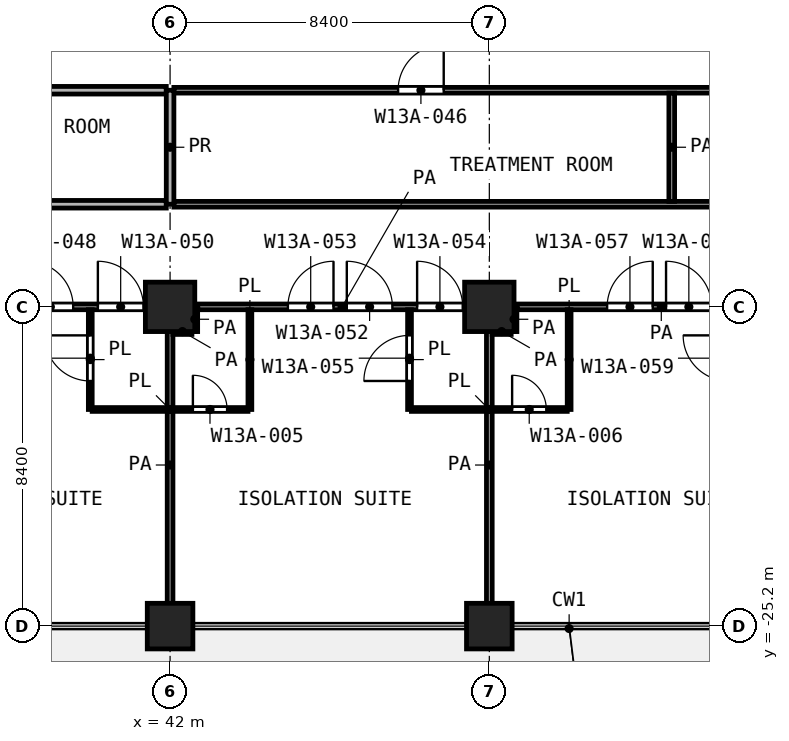
"""IFC4 building model, lengths in metres.
Left out: names, types, materials, properties, quantities, classifications, styles, units other than length and angle.
Written with IfcOpenShell. Run it as: python <this file> out.ifc"""

import sys

from ifc_helpers import new_model, si_unit, direction, frame, frame_2d, origin, origin_2d, place, context, subcontext, project, spatial, rectangle, extrude, element, fill, save


model = new_model("IFC4")
c1 = context("Model", 3, precision=1e-05, world=origin(), true_north=direction((0.0, 1.0)))
c2 = subcontext(c1, "Body", "Model", "MODEL_VIEW")
j1 = project(units=[si_unit("LENGTHUNIT", "METRE"), si_unit("PLANEANGLEUNIT", "RADIAN")], contexts=[c1])
p1 = place(None, origin())
s1 = spatial("IfcSite", under=j1, at=p1, CompositionType="ELEMENT")
p2 = place(p1, origin())
s2 = spatial("IfcBuilding", under=s1, at=p2, CompositionType="ELEMENT")
p3 = place(p2, frame((0.0, 0.0, 60.2)))
s3 = spatial("IfcBuildingStorey", under=s2, at=p3, CompositionType="ELEMENT", Elevation=60.2)
for number, where, z_axis, x_axis in (
    (1, (42.0, -16.8, 0.0), (0.0, 0.0, 1.0), (1.0, 0.0, 0.0)),
    (2, (50.4, -16.8, 0.0), (0.0, 0.0, 1.0), (1.0, 0.0, 0.0)),
):
    element("IfcColumn", number, at=place(p3, frame(where, z_axis=z_axis, x_axis=x_axis)), inside=s3, PredefinedType="COLUMN", context=c2, shape_type="SweptSolid", body=[
        extrude(rectangle(XDim=1.3, YDim=1.3, at=origin_2d()), origin(), (0.0, 0.0, 1.0), 4.2),
    ])
for number, where, z_axis, x_axis in (
    (3, (42.0, -25.2, 0.0), (0.0, 0.0, 1.0), (1.0, 0.0, 0.0)),
    (4, (50.4, -25.2, 0.0), (0.0, 0.0, 1.0), (1.0, 0.0, 0.0)),
):
    element("IfcColumn", number, at=place(p3, frame(where, z_axis=z_axis, x_axis=x_axis)), inside=s3, PredefinedType="COLUMN", context=c2, shape_type="SweptSolid", body=[
        extrude(rectangle(XDim=1.2, YDim=1.2, at=origin_2d()), origin(), (0.0, 0.0, 1.0), 4.2),
    ])
p4 = place(p3, frame((39.95, -19.5, 0.0), z_axis=(0.0, 0.0, 1.0), x_axis=(1.0, 0.0, 0.0)))
e5 = element("IfcWall", 5, at=p4, inside=s3, PredefinedType="PARTITIONING", context=c2, shape_type="SweptSolid", body=[
    extrude(rectangle(XDim=4.1, YDim=0.1, at=frame_2d((2.05, 0.0))), origin(), (0.0, 0.0, 1.0), 3.9),
])
p5 = place(p4, frame((2.65, 0.0, 0.0)))
e6 = element("IfcOpeningElement", 6, at=p5, cuts=e5, PredefinedType="OPENING", context=c2, shape_type="SweptSolid", body=[
    extrude(rectangle(XDim=0.9, YDim=2.1, at=frame_2d((0.45, 1.05))), frame((0.0, 0.06, 0.0), z_axis=(0.0, -1.0, 0.0), x_axis=(1.0, 0.0, 0.0)), (0.0, 0.0, 1.0), 0.12),
])
p6 = place(p3, frame((48.35, -19.5, 0.0), z_axis=(0.0, 0.0, 1.0), x_axis=(1.0, 0.0, 0.0)))
e7 = element("IfcWall", 7, at=p6, inside=s3, PredefinedType="PARTITIONING", context=c2, shape_type="SweptSolid", body=[
    extrude(rectangle(XDim=4.1, YDim=0.1, at=frame_2d((2.05, 0.0))), origin(), (0.0, 0.0, 1.0), 3.9),
])
p7 = place(p6, frame((2.65, 0.0, 0.0)))
e8 = element("IfcOpeningElement", 8, at=p7, cuts=e7, PredefinedType="OPENING", context=c2, shape_type="SweptSolid", body=[
    extrude(rectangle(XDim=0.9, YDim=2.1, at=frame_2d((0.45, 1.05))), frame((0.0, 0.06, 0.0), z_axis=(0.0, -1.0, 0.0), x_axis=(1.0, 0.0, 0.0)), (0.0, 0.0, 1.0), 0.12),
])
p8 = place(p3, frame((39.9, -19.5, 0.0), z_axis=(0.0, 0.0, 1.0), x_axis=(0.0, 1.0, 0.0)))
e9 = element("IfcWall", 9, at=p8, inside=s3, PredefinedType="PARTITIONING", context=c2, shape_type="SweptSolid", body=[
    extrude(rectangle(XDim=2.625, YDim=0.1, at=frame_2d((1.312, 0.0))), origin(), (0.0, 0.0, 1.0), 3.9),
])
p9 = place(p8, frame((0.75, 0.0, 0.0)))
e10 = element("IfcOpeningElement", 10, at=p9, cuts=e9, PredefinedType="OPENING", context=c2, shape_type="SweptSolid", body=[
    extrude(rectangle(XDim=1.2, YDim=2.1, at=frame_2d((0.6, 1.05))), frame((0.0, 0.06, 0.0), z_axis=(0.0, -1.0, 0.0), x_axis=(1.0, 0.0, 0.0)), (0.0, 0.0, 1.0), 0.12),
])
p10 = place(p3, frame((44.1, -19.5, 0.0), z_axis=(0.0, 0.0, 1.0), x_axis=(0.0, 1.0, 0.0)))
e11 = element("IfcWall", 11, at=p10, inside=s3, PredefinedType="PARTITIONING", context=c2, shape_type="SweptSolid", body=[
    extrude(rectangle(XDim=2.625, YDim=0.1, at=frame_2d((1.312, 0.0))), origin(), (0.0, 0.0, 1.0), 3.9),
])
p11 = place(p3, frame((48.3, -19.5, 0.0), z_axis=(0.0, 0.0, 1.0), x_axis=(0.0, 1.0, 0.0)))
e12 = element("IfcWall", 12, at=p11, inside=s3, PredefinedType="PARTITIONING", context=c2, shape_type="SweptSolid", body=[
    extrude(rectangle(XDim=2.625, YDim=0.1, at=frame_2d((1.312, 0.0))), origin(), (0.0, 0.0, 1.0), 3.9),
])
p12 = place(p11, frame((0.75, 0.0, 0.0)))
e13 = element("IfcOpeningElement", 13, at=p12, cuts=e12, PredefinedType="OPENING", context=c2, shape_type="SweptSolid", body=[
    extrude(rectangle(XDim=1.2, YDim=2.1, at=frame_2d((0.6, 1.05))), frame((0.0, 0.06, 0.0), z_axis=(0.0, -1.0, 0.0), x_axis=(1.0, 0.0, 0.0)), (0.0, 0.0, 1.0), 0.12),
])
p13 = place(p3, frame((52.5, -19.5, 0.0), z_axis=(0.0, 0.0, 1.0), x_axis=(0.0, 1.0, 0.0)))
e14 = element("IfcWall", 14, at=p13, inside=s3, PredefinedType="PARTITIONING", context=c2, shape_type="SweptSolid", body=[
    extrude(rectangle(XDim=2.625, YDim=0.1, at=frame_2d((1.312, 0.0))), origin(), (0.0, 0.0, 1.0), 3.9),
])
for number, where, z_axis, x_axis in (
    (15, (42.075, -17.45, 0.0), (0.0, 0.0, 1.0), (1.0, 0.0, 0.0)),
    (16, (50.475, -17.45, 0.0), (0.0, 0.0, 1.0), (1.0, 0.0, 0.0)),
):
    element("IfcWall", number, at=place(p3, frame(where, z_axis=z_axis, x_axis=x_axis)), inside=s3, PredefinedType="PARTITIONING", context=c2, shape_type="SweptSolid", body=[
        extrude(rectangle(XDim=0.5, YDim=0.15, at=frame_2d((0.25, 0.0))), origin(), (0.0, 0.0, 1.0), 3.9),
    ])
p14 = place(p3, frame((25.1, -16.8, 0.0), z_axis=(0.0, 0.0, 1.0), x_axis=(1.0, 0.0, 0.0)))
e17 = element("IfcWall", 17, at=p14, inside=s3, PredefinedType="PARTITIONING", context=c2, shape_type="SweptSolid", body=[
    extrude(rectangle(XDim=16.823, YDim=0.15, at=frame_2d((8.412, 0.0))), origin(), (0.0, 0.0, 1.0), 3.9),
])
p15 = place(p14, frame((1.7, 0.0, 0.0)))
e18 = element("IfcOpeningElement", 18, at=p15, cuts=e17, PredefinedType="OPENING", context=c2, shape_type="SweptSolid", body=[
    extrude(rectangle(XDim=1.0, YDim=2.1, at=frame_2d((0.5, 1.05))), frame((0.0, 0.085, 0.0), z_axis=(0.0, -1.0, 0.0), x_axis=(1.0, 0.0, 0.0)), (0.0, 0.0, 1.0), 0.17),
])
p16 = place(p14, frame((6.125, 0.0, 0.0)))
e19 = element("IfcOpeningElement", 19, at=p16, cuts=e17, PredefinedType="OPENING", context=c2, shape_type="SweptSolid", body=[
    extrude(rectangle(XDim=1.2, YDim=2.1, at=frame_2d((0.6, 1.05))), frame((0.0, 0.085, 0.0), z_axis=(0.0, -1.0, 0.0), x_axis=(1.0, 0.0, 0.0)), (0.0, 0.0, 1.0), 0.17),
])
p17 = place(p14, frame((13.15, 0.0, 0.0)))
e20 = element("IfcOpeningElement", 20, at=p17, cuts=e17, PredefinedType="OPENING", context=c2, shape_type="SweptSolid", body=[
    extrude(rectangle(XDim=1.2, YDim=2.1, at=frame_2d((0.6, 1.05))), frame((0.0, 0.085, 0.0), z_axis=(0.0, -1.0, 0.0), x_axis=(1.0, 0.0, 0.0)), (0.0, 0.0, 1.0), 0.17),
])
p18 = place(p14, frame((11.6, 0.0, 0.0)))
e21 = element("IfcOpeningElement", 21, at=p18, cuts=e17, PredefinedType="OPENING", context=c2, shape_type="SweptSolid", body=[
    extrude(rectangle(XDim=1.2, YDim=2.1, at=frame_2d((0.6, 1.05))), frame((0.0, 0.085, 0.0), z_axis=(0.0, -1.0, 0.0), x_axis=(1.0, 0.0, 0.0)), (0.0, 0.0, 1.0), 0.17),
])
p19 = place(p14, frame((15.0, 0.0, 0.0)))
e22 = element("IfcOpeningElement", 22, at=p19, cuts=e17, PredefinedType="OPENING", context=c2, shape_type="SweptSolid", body=[
    extrude(rectangle(XDim=1.2, YDim=2.1, at=frame_2d((0.6, 1.05))), frame((0.0, 0.085, 0.0), z_axis=(0.0, -1.0, 0.0), x_axis=(1.0, 0.0, 0.0)), (0.0, 0.0, 1.0), 0.17),
])
p20 = place(p3, frame((42.727, -16.8, 0.0), z_axis=(0.0, 0.0, 1.0), x_axis=(1.0, 0.0, 0.0)))
e23 = element("IfcWall", 23, at=p20, inside=s3, PredefinedType="PARTITIONING", context=c2, shape_type="SweptSolid", body=[
    extrude(rectangle(XDim=7.595, YDim=0.15, at=frame_2d((3.797, 0.0))), origin(), (0.0, 0.0, 1.0), 3.9),
])
p21 = place(p20, frame((3.923, 0.0, 0.0)))
e24 = element("IfcOpeningElement", 24, at=p21, cuts=e23, PredefinedType="OPENING", context=c2, shape_type="SweptSolid", body=[
    extrude(rectangle(XDim=1.2, YDim=2.1, at=frame_2d((0.6, 1.05))), frame((0.0, 0.085, 0.0), z_axis=(0.0, -1.0, 0.0), x_axis=(1.0, 0.0, 0.0)), (0.0, 0.0, 1.0), 0.17),
])
p22 = place(p20, frame((2.373, 0.0, 0.0)))
e25 = element("IfcOpeningElement", 25, at=p22, cuts=e23, PredefinedType="OPENING", context=c2, shape_type="SweptSolid", body=[
    extrude(rectangle(XDim=1.2, YDim=2.1, at=frame_2d((0.6, 1.05))), frame((0.0, 0.085, 0.0), z_axis=(0.0, -1.0, 0.0), x_axis=(1.0, 0.0, 0.0)), (0.0, 0.0, 1.0), 0.17),
])
p23 = place(p20, frame((5.773, 0.0, 0.0)))
e26 = element("IfcOpeningElement", 26, at=p23, cuts=e23, PredefinedType="OPENING", context=c2, shape_type="SweptSolid", body=[
    extrude(rectangle(XDim=1.2, YDim=2.1, at=frame_2d((0.6, 1.05))), frame((0.0, 0.085, 0.0), z_axis=(0.0, -1.0, 0.0), x_axis=(1.0, 0.0, 0.0)), (0.0, 0.0, 1.0), 0.17),
])
p24 = place(p3, frame((51.128, -16.8, 0.0), z_axis=(0.0, 0.0, 1.0), x_axis=(1.0, 0.0, 0.0)))
e27 = element("IfcWall", 27, at=p24, inside=s3, PredefinedType="PARTITIONING", context=c2, shape_type="SweptSolid", body=[
    extrude(rectangle(XDim=7.594, YDim=0.15, at=frame_2d((3.797, 0.0))), origin(), (0.0, 0.0, 1.0), 3.9),
])
p25 = place(p24, frame((3.922, 0.0, 0.0)))
e28 = element("IfcOpeningElement", 28, at=p25, cuts=e27, PredefinedType="OPENING", context=c2, shape_type="SweptSolid", body=[
    extrude(rectangle(XDim=1.2, YDim=2.1, at=frame_2d((0.6, 1.05))), frame((0.0, 0.085, 0.0), z_axis=(0.0, -1.0, 0.0), x_axis=(1.0, 0.0, 0.0)), (0.0, 0.0, 1.0), 0.17),
])
p26 = place(p24, frame((2.372, 0.0, 0.0)))
e29 = element("IfcOpeningElement", 29, at=p26, cuts=e27, PredefinedType="OPENING", context=c2, shape_type="SweptSolid", body=[
    extrude(rectangle(XDim=1.2, YDim=2.1, at=frame_2d((0.6, 1.05))), frame((0.0, 0.085, 0.0), z_axis=(0.0, -1.0, 0.0), x_axis=(1.0, 0.0, 0.0)), (0.0, 0.0, 1.0), 0.17),
])
p27 = place(p24, frame((5.772, 0.0, 0.0)))
e30 = element("IfcOpeningElement", 30, at=p27, cuts=e27, PredefinedType="OPENING", context=c2, shape_type="SweptSolid", body=[
    extrude(rectangle(XDim=1.2, YDim=2.1, at=frame_2d((0.6, 1.05))), frame((0.0, 0.085, 0.0), z_axis=(0.0, -1.0, 0.0), x_axis=(1.0, 0.0, 0.0)), (0.0, 0.0, 1.0), 0.17),
])
p28 = place(p3, frame((42.1, -14.1, 0.0), z_axis=(0.0, 0.0, 1.0), x_axis=(1.0, 0.0, 0.0)))
e31 = element("IfcWall", 31, at=p28, inside=s3, PredefinedType="PARTITIONING", context=c2, shape_type="SweptSolid", body=[
    extrude(rectangle(XDim=34.925, YDim=0.15, at=frame_2d((17.462, 0.0))), origin(), (0.0, 0.0, 1.0), 3.9),
])
p29 = place(p28, frame((20.85, 0.0, 0.0)))
e32 = element("IfcOpeningElement", 32, at=p29, cuts=e31, PredefinedType="OPENING", context=c2, shape_type="SweptSolid", body=[
    extrude(rectangle(XDim=1.0, YDim=2.1, at=frame_2d((0.5, 1.05))), frame((0.0, 0.085, 0.0), z_axis=(0.0, -1.0, 0.0), x_axis=(1.0, 0.0, 0.0)), (0.0, 0.0, 1.0), 0.17),
])
p30 = place(p28, frame((31.8, 0.0, 0.0)))
e33 = element("IfcOpeningElement", 33, at=p30, cuts=e31, PredefinedType="OPENING", context=c2, shape_type="SweptSolid", body=[
    extrude(rectangle(XDim=1.0, YDim=2.1, at=frame_2d((0.5, 1.05))), frame((0.0, 0.085, 0.0), z_axis=(0.0, -1.0, 0.0), x_axis=(1.0, 0.0, 0.0)), (0.0, 0.0, 1.0), 0.17),
])
p31 = place(p3, frame((42.1, -11.1, 0.0), z_axis=(0.0, 0.0, 1.0), x_axis=(1.0, 0.0, 0.0)))
e34 = element("IfcWall", 34, at=p31, inside=s3, PredefinedType="PARTITIONING", context=c2, shape_type="SweptSolid", body=[
    extrude(rectangle(XDim=34.925, YDim=0.15, at=frame_2d((17.462, 0.0))), origin(), (0.0, 0.0, 1.0), 3.9),
])
p32 = place(p31, frame((5.9, 0.0, 0.0)))
e35 = element("IfcOpeningElement", 35, at=p32, cuts=e34, PredefinedType="OPENING", context=c2, shape_type="SweptSolid", body=[
    extrude(rectangle(XDim=1.2, YDim=2.1, at=frame_2d((0.6, 1.05))), frame((0.0, 0.085, 0.0), z_axis=(0.0, -1.0, 0.0), x_axis=(1.0, 0.0, 0.0)), (0.0, 0.0, 1.0), 0.17),
])
p33 = place(p3, frame((42.0, -25.12, 0.0), z_axis=(0.0, 0.0, 1.0), x_axis=(0.0, 1.0, 0.0)))
e36 = element("IfcWall", 36, at=p33, inside=s3, PredefinedType="PARTITIONING", context=c2, shape_type="SweptSolid", body=[
    extrude(rectangle(XDim=8.318, YDim=0.15, at=frame_2d((4.159, 0.0))), origin(), (0.0, 0.0, 1.0), 3.9),
])
p34 = place(p3, frame((42.65, -17.45, 0.0), z_axis=(0.0, 0.0, 1.0), x_axis=(0.0, 1.0, 0.0)))
e37 = element("IfcWall", 37, at=p34, inside=s3, PredefinedType="PARTITIONING", context=c2, shape_type="SweptSolid", body=[
    extrude(rectangle(XDim=0.648, YDim=0.15, at=frame_2d((0.324, 0.0))), origin(), (0.0, 0.0, 1.0), 3.9),
])
p35 = place(p3, frame((50.4, -25.12, 0.0), z_axis=(0.0, 0.0, 1.0), x_axis=(0.0, 1.0, 0.0)))
e38 = element("IfcWall", 38, at=p35, inside=s3, PredefinedType="PARTITIONING", context=c2, shape_type="SweptSolid", body=[
    extrude(rectangle(XDim=8.317, YDim=0.15, at=frame_2d((4.159, 0.0))), origin(), (0.0, 0.0, 1.0), 3.9),
])
p36 = place(p3, frame((51.05, -17.45, 0.0), z_axis=(0.0, 0.0, 1.0), x_axis=(0.0, 1.0, 0.0)))
e39 = element("IfcWall", 39, at=p36, inside=s3, PredefinedType="PARTITIONING", context=c2, shape_type="SweptSolid", body=[
    extrude(rectangle(XDim=0.647, YDim=0.15, at=frame_2d((0.323, 0.0))), origin(), (0.0, 0.0, 1.0), 3.9),
])
p37 = place(p3, frame((55.2, -14.025, 0.0), z_axis=(0.0, 0.0, 1.0), x_axis=(0.0, 1.0, 0.0)))
e40 = element("IfcWall", 40, at=p37, inside=s3, PredefinedType="PARTITIONING", context=c2, shape_type="SweptSolid", body=[
    extrude(rectangle(XDim=2.85, YDim=0.15, at=frame_2d((1.425, 0.0))), origin(), (0.0, 0.0, 1.0), 3.9),
])
p38 = place(p3, frame((29.5, -14.1, 0.0), z_axis=(0.0, 0.0, 1.0), x_axis=(1.0, 0.0, 0.0)))
e41 = element("IfcWall", 41, at=p38, inside=s3, PredefinedType="PARTITIONING", context=c2, shape_type="SweptSolid", body=[
    extrude(rectangle(XDim=12.4, YDim=0.2, at=frame_2d((6.2, 0.0))), origin(), (0.0, 0.0, 1.0), 3.9),
])
p39 = place(p38, frame((5.6, 0.0, 0.0)))
e42 = element("IfcOpeningElement", 42, at=p39, cuts=e41, PredefinedType="OPENING", context=c2, shape_type="SweptSolid", body=[
    extrude(rectangle(XDim=1.2, YDim=2.1, at=frame_2d((0.6, 1.05))), frame((0.0, 0.11, 0.0), z_axis=(0.0, -1.0, 0.0), x_axis=(1.0, 0.0, 0.0)), (0.0, 0.0, 1.0), 0.22),
])
p40 = place(p3, frame((29.5, -11.1, 0.0), z_axis=(0.0, 0.0, 1.0), x_axis=(1.0, 0.0, 0.0)))
e43 = element("IfcWall", 43, at=p40, inside=s3, PredefinedType="PARTITIONING", context=c2, shape_type="SweptSolid", body=[
    extrude(rectangle(XDim=12.4, YDim=0.2, at=frame_2d((6.2, 0.0))), origin(), (0.0, 0.0, 1.0), 3.9),
])
p41 = place(p3, frame((42.0, -14.1, 0.0), z_axis=(0.0, 0.0, 1.0), x_axis=(0.0, 1.0, 0.0)))
e44 = element("IfcWall", 44, at=p41, inside=s3, PredefinedType="PARTITIONING", context=c2, shape_type="SweptSolid", body=[
    extrude(rectangle(XDim=3.0, YDim=0.2, at=frame_2d((1.5, 0.0))), origin(), (0.0, 0.0, 1.0), 3.9),
])
p42 = place(p32, origin())
e45 = element("IfcDoor", 45, at=p42, inside=s3, OperationType="SINGLE_SWING_RIGHT", PredefinedType="DOOR", context=c2, shape_type="SweptSolid", body=[
    extrude(rectangle(XDim=1.2, YDim=2.1, at=frame_2d((0.6, 1.05))), frame((0.0, 0.025, 0.0), z_axis=(0.0, -1.0, 0.0), x_axis=(1.0, 0.0, 0.0)), (0.0, 0.0, 1.0), 0.05),
])
fill(e35, e45)
p43 = place(p17, origin())
e46 = element("IfcDoor", 46, at=p43, inside=s3, OperationType="SINGLE_SWING_LEFT", PredefinedType="DOOR", context=c2, shape_type="SweptSolid", body=[
    extrude(rectangle(XDim=1.2, YDim=2.1, at=frame_2d((0.6, 1.05))), frame((0.0, 0.025, 0.0), z_axis=(0.0, -1.0, 0.0), x_axis=(1.0, 0.0, 0.0)), (0.0, 0.0, 1.0), 0.05),
])
fill(e20, e46)
p44 = place(p19, origin())
e47 = element("IfcDoor", 47, at=p44, inside=s3, OperationType="SINGLE_SWING_LEFT", PredefinedType="DOOR", context=c2, shape_type="SweptSolid", body=[
    extrude(rectangle(XDim=1.2, YDim=2.1, at=frame_2d((0.6, 1.05))), frame((0.0, 0.025, 0.0), z_axis=(0.0, -1.0, 0.0), x_axis=(1.0, 0.0, 0.0)), (0.0, 0.0, 1.0), 0.05),
])
fill(e22, e47)
p45 = place(p9, origin())
e48 = element("IfcDoor", 48, at=p45, inside=s3, OperationType="SINGLE_SWING_RIGHT", PredefinedType="DOOR", context=c2, shape_type="SweptSolid", body=[
    extrude(rectangle(XDim=1.2, YDim=2.1, at=frame_2d((0.6, 1.05))), frame((0.0, 0.025, 0.0), z_axis=(0.0, -1.0, 0.0), x_axis=(1.0, 0.0, 0.0)), (0.0, 0.0, 1.0), 0.05),
])
fill(e10, e48)
p46 = place(p21, origin())
e49 = element("IfcDoor", 49, at=p46, inside=s3, OperationType="SINGLE_SWING_LEFT", PredefinedType="DOOR", context=c2, shape_type="SweptSolid", body=[
    extrude(rectangle(XDim=1.2, YDim=2.1, at=frame_2d((0.6, 1.05))), frame((0.0, 0.025, 0.0), z_axis=(0.0, -1.0, 0.0), x_axis=(1.0, 0.0, 0.0)), (0.0, 0.0, 1.0), 0.05),
])
fill(e24, e49)
p47 = place(p22, origin())
e50 = element("IfcDoor", 50, at=p47, inside=s3, OperationType="SINGLE_SWING_RIGHT", PredefinedType="DOOR", context=c2, shape_type="SweptSolid", body=[
    extrude(rectangle(XDim=1.2, YDim=2.1, at=frame_2d((0.6, 1.05))), frame((0.0, 0.025, 0.0), z_axis=(0.0, -1.0, 0.0), x_axis=(1.0, 0.0, 0.0)), (0.0, 0.0, 1.0), 0.05),
])
fill(e25, e50)
p48 = place(p23, origin())
e51 = element("IfcDoor", 51, at=p48, inside=s3, OperationType="SINGLE_SWING_LEFT", PredefinedType="DOOR", context=c2, shape_type="SweptSolid", body=[
    extrude(rectangle(XDim=1.2, YDim=2.1, at=frame_2d((0.6, 1.05))), frame((0.0, 0.025, 0.0), z_axis=(0.0, -1.0, 0.0), x_axis=(1.0, 0.0, 0.0)), (0.0, 0.0, 1.0), 0.05),
])
fill(e26, e51)
p49 = place(p12, origin())
e52 = element("IfcDoor", 52, at=p49, inside=s3, OperationType="SINGLE_SWING_LEFT", PredefinedType="DOOR", context=c2, shape_type="SweptSolid", body=[
    extrude(rectangle(XDim=1.2, YDim=2.1, at=frame_2d((0.6, 1.05))), frame((0.0, 0.025, 0.0), z_axis=(0.0, -1.0, 0.0), x_axis=(1.0, 0.0, 0.0)), (0.0, 0.0, 1.0), 0.05),
])
fill(e13, e52)
p50 = place(p5, origin())
e53 = element("IfcDoor", 53, at=p50, inside=s3, OperationType="SINGLE_SWING_LEFT", PredefinedType="DOOR", context=c2, shape_type="SweptSolid", body=[
    extrude(rectangle(XDim=0.9, YDim=2.1, at=frame_2d((0.45, 1.05))), frame((0.0, 0.025, 0.0), z_axis=(0.0, -1.0, 0.0), x_axis=(1.0, 0.0, 0.0)), (0.0, 0.0, 1.0), 0.05),
])
fill(e6, e53)
p51 = place(p25, origin())
e54 = element("IfcDoor", 54, at=p51, inside=s3, OperationType="SINGLE_SWING_LEFT", PredefinedType="DOOR", context=c2, shape_type="SweptSolid", body=[
    extrude(rectangle(XDim=1.2, YDim=2.1, at=frame_2d((0.6, 1.05))), frame((0.0, 0.025, 0.0), z_axis=(0.0, -1.0, 0.0), x_axis=(1.0, 0.0, 0.0)), (0.0, 0.0, 1.0), 0.05),
])
fill(e28, e54)
p52 = place(p26, origin())
e55 = element("IfcDoor", 55, at=p52, inside=s3, OperationType="SINGLE_SWING_RIGHT", PredefinedType="DOOR", context=c2, shape_type="SweptSolid", body=[
    extrude(rectangle(XDim=1.2, YDim=2.1, at=frame_2d((0.6, 1.05))), frame((0.0, 0.025, 0.0), z_axis=(0.0, -1.0, 0.0), x_axis=(1.0, 0.0, 0.0)), (0.0, 0.0, 1.0), 0.05),
])
fill(e29, e55)
p53 = place(p7, origin())
e56 = element("IfcDoor", 56, at=p53, inside=s3, OperationType="SINGLE_SWING_LEFT", PredefinedType="DOOR", context=c2, shape_type="SweptSolid", body=[
    extrude(rectangle(XDim=0.9, YDim=2.1, at=frame_2d((0.45, 1.05))), frame((0.0, 0.025, 0.0), z_axis=(0.0, -1.0, 0.0), x_axis=(1.0, 0.0, 0.0)), (0.0, 0.0, 1.0), 0.05),
])
fill(e8, e56)
save(model, sys.argv[1])
